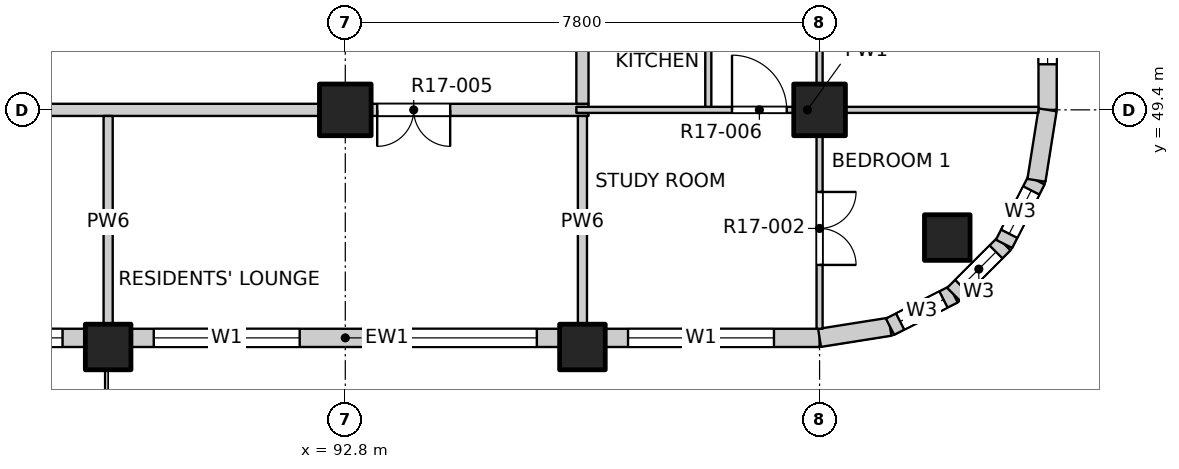
"""IFC4 building model, lengths in metres.
Left out: names, types, materials, properties, quantities, classifications, styles, units other than length and angle.
Written with IfcOpenShell. Run it as: python <this file> out.ifc"""

import sys

from ifc_helpers import new_model, si_unit, direction, frame, frame_2d, origin, origin_2d, place, context, subcontext, project, spatial, rectangle, extrude, element, fill, save


model = new_model("IFC4")
c1 = context("Model", 3, precision=1e-05, world=origin(), true_north=direction((0.0, 1.0)))
c2 = subcontext(c1, "Body", "Model", "MODEL_VIEW")
j1 = project(units=[si_unit("LENGTHUNIT", "METRE"), si_unit("PLANEANGLEUNIT", "RADIAN")], contexts=[c1])
p1 = place(None, origin())
s1 = spatial("IfcSite", under=j1, at=p1, CompositionType="ELEMENT")
p2 = place(p1, origin())
s2 = spatial("IfcBuilding", under=s1, at=p2, CompositionType="ELEMENT")
p3 = place(p2, frame((0.0, 0.0, 182.6)))
s3 = spatial("IfcBuildingStorey", under=s2, at=p3, CompositionType="ELEMENT", Elevation=182.6)
for number, where, z_axis, x_axis in (
    (1, (102.7, 47.3, -0.25), (0.0, 0.0, 1.0), (1.0, 0.0, 0.0)),
    (2, (88.9, 45.5, -0.25), (0.0, 0.0, 1.0), (1.0, 0.0, 0.0)),
    (3, (96.7, 45.5, -0.25), (0.0, 0.0, 1.0), (1.0, 0.0, 0.0)),
):
    element("IfcColumn", number, at=place(p3, frame(where, z_axis=z_axis, x_axis=x_axis)), inside=s3, PredefinedType="COLUMN", context=c2, shape_type="SweptSolid", body=[
        extrude(rectangle(XDim=0.75, YDim=0.75, at=origin_2d()), origin(), (0.0, 0.0, 1.0), 3.4),
    ])
for number, where, z_axis, x_axis in (
    (4, (92.8, 49.4, -0.25), (0.0, 0.0, 1.0), (1.0, 0.0, 0.0)),
    (5, (100.6, 49.4, -0.25), (0.0, 0.0, 1.0), (1.0, 0.0, 0.0)),
):
    element("IfcColumn", number, at=place(p3, frame(where, z_axis=z_axis, x_axis=x_axis)), inside=s3, PredefinedType="COLUMN", context=c2, shape_type="SweptSolid", body=[
        extrude(rectangle(XDim=0.85, YDim=0.85, at=origin_2d()), origin(), (0.0, 0.0, 1.0), 3.4),
    ])
p4 = place(p3, frame((81.475, 45.65, 0.0), z_axis=(0.0, 0.0, 1.0), x_axis=(1.0, 0.0, 0.0)))
e6 = element("IfcWall", 6, at=p4, inside=s3, PredefinedType="SOLIDWALL", context=c2, shape_type="SweptSolid", body=[
    extrude(rectangle(XDim=7.05, YDim=0.3, at=frame_2d((3.525, 0.0))), origin(), (0.0, 0.0, 1.0), 2.7),
])
p5 = place(p4, frame((0.675, 0.0, 0.0)))
e7 = element("IfcOpeningElement", 7, at=p5, cuts=e6, PredefinedType="OPENING", context=c2, shape_type="SweptSolid", body=[
    extrude(rectangle(XDim=1.8, YDim=2.4, at=frame_2d((0.9, 1.2))), frame((0.0, 0.16, 0.0), z_axis=(0.0, -1.0, 0.0), x_axis=(1.0, 0.0, 0.0)), (0.0, 0.0, 1.0), 0.32),
])
p6 = place(p4, frame((4.275, 0.0, 0.9)))
e8 = element("IfcOpeningElement", 8, at=p6, cuts=e6, PredefinedType="OPENING", context=c2, shape_type="SweptSolid", body=[
    extrude(rectangle(XDim=2.4, YDim=1.8, at=frame_2d((1.2, 0.9))), frame((0.0, 0.16, 0.0), z_axis=(0.0, -1.0, 0.0), x_axis=(1.0, 0.0, 0.0)), (0.0, 0.0, 1.0), 0.32),
])
p7 = place(p3, frame((89.275, 45.65, 0.0), z_axis=(0.0, 0.0, 1.0), x_axis=(1.0, 0.0, 0.0)))
e9 = element("IfcWall", 9, at=p7, inside=s3, PredefinedType="SOLIDWALL", context=c2, shape_type="SweptSolid", body=[
    extrude(rectangle(XDim=7.05, YDim=0.3, at=frame_2d((3.525, 0.0))), origin(), (0.0, 0.0, 1.0), 2.7),
])
p8 = place(p7, frame((0.375, 0.0, 0.9)))
e10 = element("IfcOpeningElement", 10, at=p8, cuts=e9, PredefinedType="OPENING", context=c2, shape_type="SweptSolid", body=[
    extrude(rectangle(XDim=2.4, YDim=1.8, at=frame_2d((1.2, 0.9))), frame((0.0, 0.16, 0.0), z_axis=(0.0, -1.0, 0.0), x_axis=(1.0, 0.0, 0.0)), (0.0, 0.0, 1.0), 0.32),
])
p9 = place(p7, frame((4.275, 0.0, 0.9)))
e11 = element("IfcOpeningElement", 11, at=p9, cuts=e9, PredefinedType="OPENING", context=c2, shape_type="SweptSolid", body=[
    extrude(rectangle(XDim=2.4, YDim=1.8, at=frame_2d((1.2, 0.9))), frame((0.0, 0.16, 0.0), z_axis=(0.0, -1.0, 0.0), x_axis=(1.0, 0.0, 0.0)), (0.0, 0.0, 1.0), 0.32),
])
p10 = place(p3, frame((97.075, 45.65, 0.0), z_axis=(0.0, 0.0, 1.0), x_axis=(1.0, 0.0, 0.0)))
e12 = element("IfcWall", 12, at=p10, inside=s3, PredefinedType="SOLIDWALL", context=c2, shape_type="SweptSolid", body=[
    extrude(rectangle(XDim=3.525, YDim=0.3, at=frame_2d((1.763, 0.0))), origin(), (0.0, 0.0, 1.0), 2.7),
])
p11 = place(p10, frame((0.375, 0.0, 0.9)))
e13 = element("IfcOpeningElement", 13, at=p11, cuts=e12, PredefinedType="OPENING", context=c2, shape_type="SweptSolid", body=[
    extrude(rectangle(XDim=2.4, YDim=1.8, at=frame_2d((1.2, 0.9))), frame((0.0, 0.16, 0.0), z_axis=(0.0, -1.0, 0.0), x_axis=(1.0, 0.0, 0.0)), (0.0, 0.0, 1.0), 0.32),
])
p12 = place(p3, frame((104.35, 49.4, 0.0), z_axis=(0.0, 0.0, 1.0), x_axis=(0.0, 1.0, 0.0)))
e14 = element("IfcWall", 14, at=p12, inside=s3, PredefinedType="SOLIDWALL", context=c2, shape_type="SweptSolid", body=[
    extrude(rectangle(XDim=3.525, YDim=0.3, at=frame_2d((1.763, 0.0))), origin(), (0.0, 0.0, 1.0), 2.7),
])
p13 = place(p12, frame((0.75, 0.0, 0.9)))
e15 = element("IfcOpeningElement", 15, at=p13, cuts=e14, PredefinedType="OPENING", context=c2, shape_type="SweptSolid", body=[
    extrude(rectangle(XDim=2.4, YDim=1.8, at=frame_2d((1.2, 0.9))), frame((0.0, 0.16, 0.0), z_axis=(0.0, -1.0, 0.0), x_axis=(1.0, 0.0, 0.0)), (0.0, 0.0, 1.0), 0.32),
])
p14 = place(p3, frame((100.6, 45.65, 0.0), z_axis=(0.0, 0.0, 1.0), x_axis=(0.987678452879, 0.156496880861, 0.0)))
e16 = element("IfcWall", 16, at=p14, inside=s3, PredefinedType="SOLIDWALL", context=c2, shape_type="SweptSolid", body=[
    extrude(rectangle(XDim=1.173, YDim=0.3, at=frame_2d((0.586, 0.0))), origin(), (0.0, 0.0, 1.0), 2.7),
])
p15 = place(p3, frame((101.759, 45.833, 0.0), z_axis=(0.0, 0.0, 1.0), x_axis=(0.890988677504, 0.454025524128, 0.0)))
e17 = element("IfcWall", 17, at=p15, inside=s3, PredefinedType="SOLIDWALL", context=c2, shape_type="SweptSolid", body=[
    extrude(rectangle(XDim=1.173, YDim=0.3, at=frame_2d((0.587, 0.0))), origin(), (0.0, 0.0, 1.0), 2.7),
])
p16 = place(p15, frame((0.187, 0.0, 0.9)))
e18 = element("IfcOpeningElement", 18, at=p16, cuts=e17, PredefinedType="OPENING", context=c2, shape_type="SweptSolid", body=[
    extrude(rectangle(XDim=0.8, YDim=1.2, at=frame_2d((0.4, 0.6))), frame((0.0, 0.16, 0.0), z_axis=(0.0, -1.0, 0.0), x_axis=(1.0, 0.0, 0.0)), (0.0, 0.0, 1.0), 0.32),
])
p17 = place(p3, frame((102.804, 46.366, 0.0), z_axis=(0.0, 0.0, 1.0), x_axis=(0.707106781187, 0.707106781187, 0.0)))
e19 = element("IfcWall", 19, at=p17, inside=s3, PredefinedType="SOLIDWALL", context=c2, shape_type="SweptSolid", body=[
    extrude(rectangle(XDim=1.173, YDim=0.3, at=frame_2d((0.586, 0.0))), origin(), (0.0, 0.0, 1.0), 2.7),
])
p18 = place(p17, frame((0.187, 0.0, 0.9)))
e20 = element("IfcOpeningElement", 20, at=p18, cuts=e19, PredefinedType="OPENING", context=c2, shape_type="SweptSolid", body=[
    extrude(rectangle(XDim=0.8, YDim=1.2, at=frame_2d((0.4, 0.6))), frame((0.0, 0.16, 0.0), z_axis=(0.0, -1.0, 0.0), x_axis=(1.0, 0.0, 0.0)), (0.0, 0.0, 1.0), 0.32),
])
p19 = place(p3, frame((103.634, 47.196, 0.0), z_axis=(0.0, 0.0, 1.0), x_axis=(0.454025524128, 0.890988677504, 0.0)))
e21 = element("IfcWall", 21, at=p19, inside=s3, PredefinedType="SOLIDWALL", context=c2, shape_type="SweptSolid", body=[
    extrude(rectangle(XDim=1.173, YDim=0.3, at=frame_2d((0.587, 0.0))), origin(), (0.0, 0.0, 1.0), 2.7),
])
p20 = place(p19, frame((0.187, 0.0, 0.9)))
e22 = element("IfcOpeningElement", 22, at=p20, cuts=e21, PredefinedType="OPENING", context=c2, shape_type="SweptSolid", body=[
    extrude(rectangle(XDim=0.8, YDim=1.2, at=frame_2d((0.4, 0.6))), frame((0.0, 0.16, 0.0), z_axis=(0.0, -1.0, 0.0), x_axis=(1.0, 0.0, 0.0)), (0.0, 0.0, 1.0), 0.32),
])
p21 = place(p3, frame((104.167, 48.241, 0.0), z_axis=(0.0, 0.0, 1.0), x_axis=(0.156496880861, 0.987678452879, 0.0)))
e23 = element("IfcWall", 23, at=p21, inside=s3, PredefinedType="SOLIDWALL", context=c2, shape_type="SweptSolid", body=[
    extrude(rectangle(XDim=1.173, YDim=0.3, at=frame_2d((0.586, 0.0))), origin(), (0.0, 0.0, 1.0), 2.7),
])
p22 = place(p3, frame((73.2, 49.4, 0.0), z_axis=(0.0, 0.0, 1.0), x_axis=(1.0, 0.0, 0.0)))
e24 = element("IfcWall", 24, at=p22, inside=s3, PredefinedType="PARTITIONING", context=c2, shape_type="SweptSolid", body=[
    extrude(rectangle(XDim=23.6, YDim=0.2, at=frame_2d((11.8, 0.0))), origin(), (0.0, 0.0, 1.0), 3.15),
])
p23 = place(p22, frame((7.3, 0.0, 0.0)))
e25 = element("IfcOpeningElement", 25, at=p23, cuts=e24, PredefinedType="OPENING", context=c2, shape_type="SweptSolid", body=[
    extrude(rectangle(XDim=1.2, YDim=2.1, at=frame_2d((0.6, 1.05))), frame((0.0, 0.11, 0.0), z_axis=(0.0, -1.0, 0.0), x_axis=(1.0, 0.0, 0.0)), (0.0, 0.0, 1.0), 0.22),
])
p24 = place(p22, frame((20.125, 0.0, 0.0)))
e26 = element("IfcOpeningElement", 26, at=p24, cuts=e24, PredefinedType="OPENING", context=c2, shape_type="SweptSolid", body=[
    extrude(rectangle(XDim=1.2, YDim=2.1, at=frame_2d((0.6, 1.05))), frame((0.0, 0.11, 0.0), z_axis=(0.0, -1.0, 0.0), x_axis=(1.0, 0.0, 0.0)), (0.0, 0.0, 1.0), 0.22),
])
p25 = place(p3, frame((96.6, 49.4, 0.0), z_axis=(0.0, 0.0, 1.0), x_axis=(1.0, 0.0, 0.0)))
e27 = element("IfcWall", 27, at=p25, inside=s3, PredefinedType="PARTITIONING", context=c2, shape_type="SweptSolid", body=[
    extrude(rectangle(XDim=7.6, YDim=0.1, at=frame_2d((3.8, 0.0))), origin(), (0.0, 0.0, 1.0), 3.15),
])
p26 = place(p25, frame((2.56, 0.0, 0.0)))
e28 = element("IfcOpeningElement", 28, at=p26, cuts=e27, PredefinedType="OPENING", context=c2, shape_type="SweptSolid", body=[
    extrude(rectangle(XDim=0.9, YDim=2.1, at=frame_2d((0.45, 1.05))), frame((0.0, 0.06, 0.0), z_axis=(0.0, -1.0, 0.0), x_axis=(1.0, 0.0, 0.0)), (0.0, 0.0, 1.0), 0.12),
])
for number, where, z_axis, x_axis in (
    (29, (88.9, 45.8, 0.0), (0.0, 0.0, 1.0), (0.0, 1.0, 0.0)),
    (30, (96.7, 45.8, 0.0), (0.0, 0.0, 1.0), (0.0, 1.0, 0.0)),
):
    element("IfcWall", number, at=place(p3, frame(where, z_axis=z_axis, x_axis=x_axis)), inside=s3, PredefinedType="PARTITIONING", context=c2, shape_type="SweptSolid", body=[
        extrude(rectangle(XDim=3.5, YDim=0.15, at=frame_2d((1.75, 0.0))), origin(), (0.0, 0.0, 1.0), 3.15),
    ])
p27 = place(p3, frame((96.7, 49.5, 0.0), z_axis=(0.0, 0.0, 1.0), x_axis=(0.0, 1.0, 0.0)))
e31 = element("IfcWall", 31, at=p27, inside=s3, PredefinedType="PARTITIONING", context=c2, shape_type="SweptSolid", body=[
    extrude(rectangle(XDim=34.7, YDim=0.2, at=frame_2d((17.35, 0.0))), origin(), (0.0, 0.0, 1.0), 3.15),
])
p28 = place(p27, frame((6.875, 0.0, 0.0)))
e32 = element("IfcOpeningElement", 32, at=p28, cuts=e31, PredefinedType="OPENING", context=c2, shape_type="SweptSolid", body=[
    extrude(rectangle(XDim=1.0, YDim=2.1, at=frame_2d((0.5, 1.05))), frame((0.0, 0.11, 0.0), z_axis=(0.0, -1.0, 0.0), x_axis=(1.0, 0.0, 0.0)), (0.0, 0.0, 1.0), 0.22),
])
p29 = place(p27, frame((21.775, 0.0, 0.0)))
e33 = element("IfcOpeningElement", 33, at=p29, cuts=e31, PredefinedType="OPENING", context=c2, shape_type="SweptSolid", body=[
    extrude(rectangle(XDim=1.0, YDim=2.1, at=frame_2d((0.5, 1.05))), frame((0.0, 0.11, 0.0), z_axis=(0.0, -1.0, 0.0), x_axis=(1.0, 0.0, 0.0)), (0.0, 0.0, 1.0), 0.22),
])
p30 = place(p27, frame((27.725, 0.0, 0.0)))
e34 = element("IfcOpeningElement", 34, at=p30, cuts=e31, PredefinedType="OPENING", context=c2, shape_type="SweptSolid", body=[
    extrude(rectangle(XDim=1.0, YDim=2.1, at=frame_2d((0.5, 1.05))), frame((0.0, 0.11, 0.0), z_axis=(0.0, -1.0, 0.0), x_axis=(1.0, 0.0, 0.0)), (0.0, 0.0, 1.0), 0.22),
])
p31 = place(p3, frame((98.77, 49.45, 0.0), z_axis=(0.0, 0.0, 1.0), x_axis=(0.0, 1.0, 0.0)))
e35 = element("IfcWall", 35, at=p31, inside=s3, PredefinedType="PARTITIONING", context=c2, shape_type="SweptSolid", body=[
    extrude(rectangle(XDim=5.6, YDim=0.1, at=frame_2d((2.8, 0.0))), origin(), (0.0, 0.0, 1.0), 3.15),
])
p32 = place(p31, frame((1.15, 0.0, 0.0)))
e36 = element("IfcOpeningElement", 36, at=p32, cuts=e35, PredefinedType="OPENING", context=c2, shape_type="SweptSolid", body=[
    extrude(rectangle(XDim=0.9, YDim=2.1, at=frame_2d((0.45, 1.05))), frame((0.0, 0.06, 0.0), z_axis=(0.0, -1.0, 0.0), x_axis=(1.0, 0.0, 0.0)), (0.0, 0.0, 1.0), 0.12),
])
p33 = place(p31, frame((4.0, 0.0, 0.0)))
e37 = element("IfcOpeningElement", 37, at=p33, cuts=e35, PredefinedType="OPENING", context=c2, shape_type="SweptSolid", body=[
    extrude(rectangle(XDim=0.9, YDim=2.1, at=frame_2d((0.45, 1.05))), frame((0.0, 0.06, 0.0), z_axis=(0.0, -1.0, 0.0), x_axis=(1.0, 0.0, 0.0)), (0.0, 0.0, 1.0), 0.12),
])
p34 = place(p3, frame((100.6, 45.8, 0.0), z_axis=(0.0, 0.0, 1.0), x_axis=(0.0, 1.0, 0.0)))
e38 = element("IfcWall", 38, at=p34, inside=s3, PredefinedType="PARTITIONING", context=c2, shape_type="SweptSolid", body=[
    extrude(rectangle(XDim=38.4, YDim=0.1, at=frame_2d((19.2, 0.0))), origin(), (0.0, 0.0, 1.0), 3.15),
])
p35 = place(p34, frame((1.05, 0.0, 0.0)))
e39 = element("IfcOpeningElement", 39, at=p35, cuts=e38, PredefinedType="OPENING", context=c2, shape_type="SweptSolid", body=[
    extrude(rectangle(XDim=1.2, YDim=2.1, at=frame_2d((0.6, 1.05))), frame((0.0, 0.06, 0.0), z_axis=(0.0, -1.0, 0.0), x_axis=(1.0, 0.0, 0.0)), (0.0, 0.0, 1.0), 0.12),
])
p36 = place(p34, frame((5.1, 0.0, 0.0)))
e40 = element("IfcOpeningElement", 40, at=p36, cuts=e38, PredefinedType="OPENING", context=c2, shape_type="SweptSolid", body=[
    extrude(rectangle(XDim=0.9, YDim=2.1, at=frame_2d((0.45, 1.05))), frame((0.0, 0.06, 0.0), z_axis=(0.0, -1.0, 0.0), x_axis=(1.0, 0.0, 0.0)), (0.0, 0.0, 1.0), 0.12),
])
p37 = place(p34, frame((9.0, 0.0, 0.0)))
e41 = element("IfcOpeningElement", 41, at=p37, cuts=e38, PredefinedType="OPENING", context=c2, shape_type="SweptSolid", body=[
    extrude(rectangle(XDim=0.9, YDim=2.1, at=frame_2d((0.45, 1.05))), frame((0.0, 0.06, 0.0), z_axis=(0.0, -1.0, 0.0), x_axis=(1.0, 0.0, 0.0)), (0.0, 0.0, 1.0), 0.12),
])
p38 = place(p34, frame((12.9, 0.0, 0.0)))
e42 = element("IfcOpeningElement", 42, at=p38, cuts=e38, PredefinedType="OPENING", context=c2, shape_type="SweptSolid", body=[
    extrude(rectangle(XDim=0.9, YDim=2.1, at=frame_2d((0.45, 1.05))), frame((0.0, 0.06, 0.0), z_axis=(0.0, -1.0, 0.0), x_axis=(1.0, 0.0, 0.0)), (0.0, 0.0, 1.0), 0.12),
])
p39 = place(p34, frame((19.725, 0.0, 0.0)))
e43 = element("IfcOpeningElement", 43, at=p39, cuts=e38, PredefinedType="OPENING", context=c2, shape_type="SweptSolid", body=[
    extrude(rectangle(XDim=1.2, YDim=2.1, at=frame_2d((0.6, 1.05))), frame((0.0, 0.06, 0.0), z_axis=(0.0, -1.0, 0.0), x_axis=(1.0, 0.0, 0.0)), (0.0, 0.0, 1.0), 0.12),
])
p40 = place(p34, frame((24.6, 0.0, 0.0)))
e44 = element("IfcOpeningElement", 44, at=p40, cuts=e38, PredefinedType="OPENING", context=c2, shape_type="SweptSolid", body=[
    extrude(rectangle(XDim=0.9, YDim=2.1, at=frame_2d((0.45, 1.05))), frame((0.0, 0.06, 0.0), z_axis=(0.0, -1.0, 0.0), x_axis=(1.0, 0.0, 0.0)), (0.0, 0.0, 1.0), 0.12),
])
p41 = place(p34, frame((28.5, 0.0, 0.0)))
e45 = element("IfcOpeningElement", 45, at=p41, cuts=e38, PredefinedType="OPENING", context=c2, shape_type="SweptSolid", body=[
    extrude(rectangle(XDim=0.9, YDim=2.1, at=frame_2d((0.45, 1.05))), frame((0.0, 0.06, 0.0), z_axis=(0.0, -1.0, 0.0), x_axis=(1.0, 0.0, 0.0)), (0.0, 0.0, 1.0), 0.12),
])
p42 = place(p34, frame((32.4, 0.0, 0.0)))
e46 = element("IfcOpeningElement", 46, at=p42, cuts=e38, PredefinedType="OPENING", context=c2, shape_type="SweptSolid", body=[
    extrude(rectangle(XDim=0.9, YDim=2.1, at=frame_2d((0.45, 1.05))), frame((0.0, 0.06, 0.0), z_axis=(0.0, -1.0, 0.0), x_axis=(1.0, 0.0, 0.0)), (0.0, 0.0, 1.0), 0.12),
])
p43 = place(p34, frame((36.15, 0.0, 0.0)))
e47 = element("IfcOpeningElement", 47, at=p43, cuts=e38, PredefinedType="OPENING", context=c2, shape_type="SweptSolid", body=[
    extrude(rectangle(XDim=1.2, YDim=2.1, at=frame_2d((0.6, 1.05))), frame((0.0, 0.06, 0.0), z_axis=(0.0, -1.0, 0.0), x_axis=(1.0, 0.0, 0.0)), (0.0, 0.0, 1.0), 0.12),
])
p44 = place(p6, origin())
e48 = element("IfcWindow", 48, at=p44, inside=s3, PartitioningType="DOUBLE_PANEL_VERTICAL", PredefinedType="WINDOW", context=c2, shape_type="SweptSolid", body=[
    extrude(rectangle(XDim=2.4, YDim=1.8, at=frame_2d((1.2, 0.9))), frame((0.0, 0.03, 0.0), z_axis=(0.0, -1.0, 0.0), x_axis=(1.0, 0.0, 0.0)), (0.0, 0.0, 1.0), 0.06),
])
fill(e8, e48)
p45 = place(p8, origin())
e49 = element("IfcWindow", 49, at=p45, inside=s3, PartitioningType="DOUBLE_PANEL_VERTICAL", PredefinedType="WINDOW", context=c2, shape_type="SweptSolid", body=[
    extrude(rectangle(XDim=2.4, YDim=1.8, at=frame_2d((1.2, 0.9))), frame((0.0, 0.03, 0.0), z_axis=(0.0, -1.0, 0.0), x_axis=(1.0, 0.0, 0.0)), (0.0, 0.0, 1.0), 0.06),
])
fill(e10, e49)
p46 = place(p9, origin())
e50 = element("IfcWindow", 50, at=p46, inside=s3, PartitioningType="DOUBLE_PANEL_VERTICAL", PredefinedType="WINDOW", context=c2, shape_type="SweptSolid", body=[
    extrude(rectangle(XDim=2.4, YDim=1.8, at=frame_2d((1.2, 0.9))), frame((0.0, 0.03, 0.0), z_axis=(0.0, -1.0, 0.0), x_axis=(1.0, 0.0, 0.0)), (0.0, 0.0, 1.0), 0.06),
])
fill(e11, e50)
p47 = place(p11, origin())
e51 = element("IfcWindow", 51, at=p47, inside=s3, PartitioningType="DOUBLE_PANEL_VERTICAL", PredefinedType="WINDOW", context=c2, shape_type="SweptSolid", body=[
    extrude(rectangle(XDim=2.4, YDim=1.8, at=frame_2d((1.2, 0.9))), frame((0.0, 0.03, 0.0), z_axis=(0.0, -1.0, 0.0), x_axis=(1.0, 0.0, 0.0)), (0.0, 0.0, 1.0), 0.06),
])
fill(e13, e51)
p48 = place(p13, origin())
e52 = element("IfcWindow", 52, at=p48, inside=s3, PartitioningType="DOUBLE_PANEL_VERTICAL", PredefinedType="WINDOW", context=c2, shape_type="SweptSolid", body=[
    extrude(rectangle(XDim=2.4, YDim=1.8, at=frame_2d((1.2, 0.9))), frame((0.0, 0.03, 0.0), z_axis=(0.0, -1.0, 0.0), x_axis=(1.0, 0.0, 0.0)), (0.0, 0.0, 1.0), 0.06),
])
fill(e15, e52)
p49 = place(p16, origin())
e53 = element("IfcWindow", 53, at=p49, inside=s3, PartitioningType="SINGLE_PANEL", PredefinedType="WINDOW", context=c2, shape_type="SweptSolid", body=[
    extrude(rectangle(XDim=0.8, YDim=1.2, at=frame_2d((0.4, 0.6))), frame((0.0, 0.03, 0.0), z_axis=(0.0, -1.0, 0.0), x_axis=(1.0, 0.0, 0.0)), (0.0, 0.0, 1.0), 0.06),
])
fill(e18, e53)
p50 = place(p18, origin())
e54 = element("IfcWindow", 54, at=p50, inside=s3, PartitioningType="SINGLE_PANEL", PredefinedType="WINDOW", context=c2, shape_type="SweptSolid", body=[
    extrude(rectangle(XDim=0.8, YDim=1.2, at=frame_2d((0.4, 0.6))), frame((0.0, 0.03, 0.0), z_axis=(0.0, -1.0, 0.0), x_axis=(1.0, 0.0, 0.0)), (0.0, 0.0, 1.0), 0.06),
])
fill(e20, e54)
p51 = place(p20, origin())
e55 = element("IfcWindow", 55, at=p51, inside=s3, PartitioningType="SINGLE_PANEL", PredefinedType="WINDOW", context=c2, shape_type="SweptSolid", body=[
    extrude(rectangle(XDim=0.8, YDim=1.2, at=frame_2d((0.4, 0.6))), frame((0.0, 0.03, 0.0), z_axis=(0.0, -1.0, 0.0), x_axis=(1.0, 0.0, 0.0)), (0.0, 0.0, 1.0), 0.06),
])
fill(e22, e55)
p52 = place(p35, origin())
e56 = element("IfcDoor", 56, at=p52, inside=s3, OperationType="DOUBLE_DOOR_SINGLE_SWING", PredefinedType="DOOR", context=c2, shape_type="SweptSolid", body=[
    extrude(rectangle(XDim=1.2, YDim=2.1, at=frame_2d((0.6, 1.05))), frame((0.0, 0.025, 0.0), z_axis=(0.0, -1.0, 0.0), x_axis=(1.0, 0.0, 0.0)), (0.0, 0.0, 1.0), 0.05),
])
fill(e39, e56)
p53 = place(p24, origin())
e57 = element("IfcDoor", 57, at=p53, inside=s3, OperationType="DOUBLE_DOOR_SINGLE_SWING", PredefinedType="DOOR", context=c2, shape_type="SweptSolid", body=[
    extrude(rectangle(XDim=1.2, YDim=2.1, at=frame_2d((0.6, 1.05))), frame((0.0, 0.025, 0.0), z_axis=(0.0, -1.0, 0.0), x_axis=(1.0, 0.0, 0.0)), (0.0, 0.0, 1.0), 0.05),
])
fill(e26, e57)
p54 = place(p26, origin())
e58 = element("IfcDoor", 58, at=p54, inside=s3, OperationType="SINGLE_SWING_LEFT", PredefinedType="DOOR", context=c2, shape_type="SweptSolid", body=[
    extrude(rectangle(XDim=0.9, YDim=2.1, at=frame_2d((0.45, 1.05))), frame((0.0, 0.025, 0.0), z_axis=(0.0, -1.0, 0.0), x_axis=(1.0, 0.0, 0.0)), (0.0, 0.0, 1.0), 0.05),
])
fill(e28, e58)
save(model, sys.argv[1])
